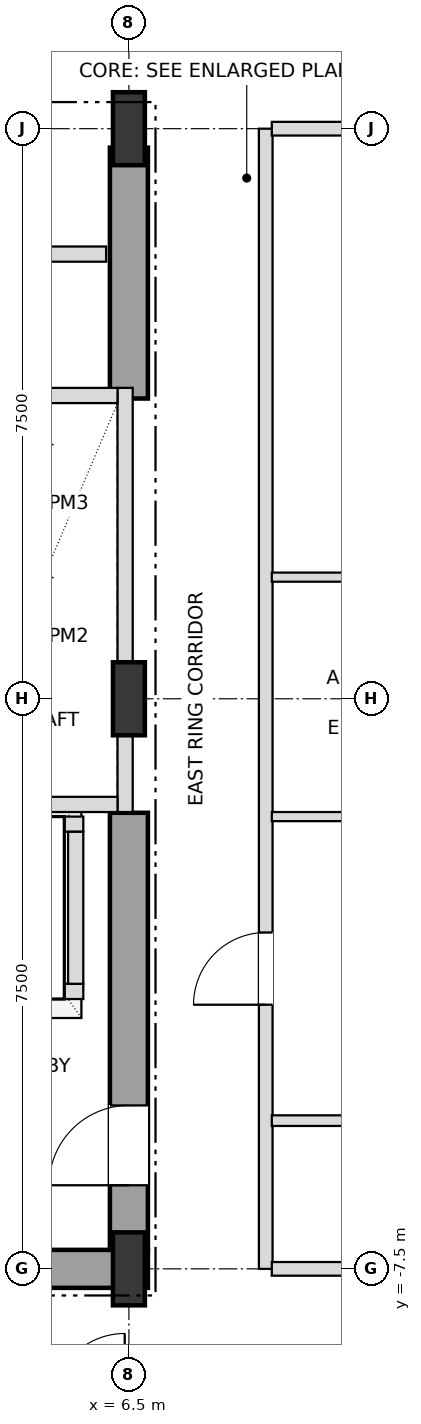
"""IFC4 building model, lengths in metres.
Left out: names, types, materials, properties, quantities, classifications, styles, units other than length and angle.
Written with IfcOpenShell. Run it as: python <this file> out.ifc"""

import sys

from ifc_helpers import new_model, si_unit, direction, frame, frame_2d, origin, origin_2d, place, context, subcontext, project, spatial, rectangle, i_section, extrude, element, fill, save


model = new_model("IFC4")
c1 = context("Model", 3, precision=1e-05, world=origin(), true_north=direction((0.0, 1.0)))
c2 = subcontext(c1, "Body", "Model", "MODEL_VIEW")
j1 = project(units=[si_unit("LENGTHUNIT", "METRE"), si_unit("PLANEANGLEUNIT", "RADIAN")], contexts=[c1])
p1 = place(None, origin())
s1 = spatial("IfcSite", under=j1, at=p1, CompositionType="ELEMENT")
p2 = place(p1, origin())
s2 = spatial("IfcBuilding", under=s1, at=p2, CompositionType="ELEMENT")
p3 = place(p2, frame((0.0, 0.0, 54.0)))
s3 = spatial("IfcBuildingStorey", under=s2, at=p3, CompositionType="ELEMENT", Elevation=54.0)
for number, where, z_axis, x_axis in (
    (1, (6.5, -7.5, 0.0), (0.0, 0.0, 1.0), (1.0, 0.0, 0.0)),
    (2, (6.5, 0.0, 0.0), (0.0, 0.0, 1.0), (1.0, 0.0, 0.0)),
    (3, (6.5, 7.5, 0.0), (0.0, 0.0, 1.0), (1.0, 0.0, 0.0)),
):
    element("IfcColumn", number, at=place(p3, frame(where, z_axis=z_axis, x_axis=x_axis)), inside=s3, PredefinedType="COLUMN", context=c2, shape_type="SweptSolid", body=[
        extrude(i_section(OverallWidth=0.42, OverallDepth=0.96, WebThickness=0.022, FlangeThickness=0.034, at=origin_2d()), origin(), (0.0, 0.0, 1.0), 3.6),
    ])
p4 = place(p3, frame((0.0, -7.5, 0.0), z_axis=(0.0, 0.0, 1.0), x_axis=(1.0, 0.0, 0.0)))
e4 = element("IfcWall", 4, at=p4, inside=s3, PredefinedType="SHEAR", context=c2, shape_type="SweptSolid", body=[
    extrude(rectangle(XDim=6.75, YDim=0.5, at=frame_2d((3.375, 0.0))), origin(), (0.0, 0.0, 1.0), 3.38),
])
p5 = place(p3, frame((6.5, -7.25, 0.0), z_axis=(0.0, 0.0, 1.0), x_axis=(0.0, 1.0, 0.0)))
e5 = element("IfcWall", 5, at=p5, inside=s3, PredefinedType="SHEAR", context=c2, shape_type="SweptSolid", body=[
    extrude(rectangle(XDim=5.75, YDim=0.5, at=frame_2d((2.875, 0.0))), origin(), (0.0, 0.0, 1.0), 3.38),
])
p6 = place(p5, frame((0.85, 0.0, 0.0)))
e6 = element("IfcOpeningElement", 6, at=p6, cuts=e5, PredefinedType="OPENING", context=c2, shape_type="SweptSolid", body=[
    extrude(rectangle(XDim=1.05, YDim=2.15, at=frame_2d((0.525, 1.075))), frame((0.0, 0.26, 0.0), z_axis=(0.0, -1.0, 0.0), x_axis=(1.0, 0.0, 0.0)), (0.0, 0.0, 1.0), 0.52),
])
p7 = place(p3, frame((6.5, 3.95, 0.0), z_axis=(0.0, 0.0, 1.0), x_axis=(0.0, 1.0, 0.0)))
e7 = element("IfcWall", 7, at=p7, inside=s3, PredefinedType="SHEAR", context=c2, shape_type="SweptSolid", body=[
    extrude(rectangle(XDim=3.3, YDim=0.5, at=frame_2d((1.65, 0.0))), origin(), (0.0, 0.0, 1.0), 3.38),
])
p8 = place(p3, frame((6.45, -1.49, 0.0), z_axis=(0.0, 0.0, 1.0), x_axis=(0.0, 1.0, 0.0)))
e8 = element("IfcWall", 8, at=p8, inside=s3, PredefinedType="SOLIDWALL", context=c2, shape_type="SweptSolid", body=[
    extrude(rectangle(XDim=5.58, YDim=0.2, at=frame_2d((2.79, 0.0))), origin(), (0.0, 0.0, 1.0), 2.816),
])
for number, where, z_axis, x_axis in (
    (9, (4.15, -1.39, 0.0), (0.0, 0.0, 1.0), (1.0, 0.0, 0.0)),
    (10, (4.15, 3.99, 0.0), (0.0, 0.0, 1.0), (1.0, 0.0, 0.0)),
):
    element("IfcWall", number, at=place(p3, frame(where, z_axis=z_axis, x_axis=x_axis)), inside=s3, PredefinedType="SOLIDWALL", context=c2, shape_type="SweptSolid", body=[
        extrude(rectangle(XDim=2.2, YDim=0.2, at=frame_2d((1.1, 0.0))), origin(), (0.0, 0.0, 1.0), 3.38),
    ])
p9 = place(p3, frame((1.8, -3.85, 0.0), z_axis=(0.0, 0.0, 1.0), x_axis=(1.0, 0.0, 0.0)))
e11 = element("IfcWall", 11, at=p9, inside=s3, PredefinedType="SOLIDWALL", context=c2, shape_type="SweptSolid", body=[
    extrude(rectangle(XDim=4.1, YDim=0.2, at=frame_2d((2.05, 0.0))), origin(), (0.0, 0.0, 1.0), 3.38),
])
p10 = place(p9, frame((0.45, 0.0, 0.0)))
e12 = element("IfcOpeningElement", 12, at=p10, cuts=e11, PredefinedType="OPENING", context=c2, shape_type="SweptSolid", body=[
    extrude(rectangle(XDim=1.2, YDim=2.2, at=frame_2d((0.6, 1.1))), frame((0.0, 0.11, 0.0), z_axis=(0.0, -1.0, 0.0), x_axis=(1.0, 0.0, 0.0)), (0.0, 0.0, 1.0), 0.22),
])
p11 = place(p9, frame((2.45, 0.0, 0.0)))
e13 = element("IfcOpeningElement", 13, at=p11, cuts=e11, PredefinedType="OPENING", context=c2, shape_type="SweptSolid", body=[
    extrude(rectangle(XDim=1.2, YDim=2.2, at=frame_2d((0.6, 1.1))), frame((0.0, 0.11, 0.0), z_axis=(0.0, -1.0, 0.0), x_axis=(1.0, 0.0, 0.0)), (0.0, 0.0, 1.0), 0.22),
])
p12 = place(p3, frame((1.8, -1.65, 0.0), z_axis=(0.0, 0.0, 1.0), x_axis=(1.0, 0.0, 0.0)))
e14 = element("IfcWall", 14, at=p12, inside=s3, PredefinedType="SOLIDWALL", context=c2, shape_type="SweptSolid", body=[
    extrude(rectangle(XDim=4.1, YDim=0.2, at=frame_2d((2.05, 0.0))), origin(), (0.0, 0.0, 1.0), 3.38),
])
p13 = place(p3, frame((5.8, -3.75, 0.0), z_axis=(0.0, 0.0, 1.0), x_axis=(0.0, 1.0, 0.0)))
e15 = element("IfcWall", 15, at=p13, inside=s3, PredefinedType="SOLIDWALL", context=c2, shape_type="SweptSolid", body=[
    extrude(rectangle(XDim=2.0, YDim=0.2, at=frame_2d((1.0, 0.0))), origin(), (0.0, 0.0, 1.0), 3.38),
])
p14 = place(p3, frame((8.3, -7.5, 0.0), z_axis=(0.0, 0.0, 1.0), x_axis=(0.0, 1.0, 0.0)))
e16 = element("IfcWall", 16, at=p14, inside=s3, PredefinedType="PARTITIONING", context=c2, shape_type="SweptSolid", body=[
    extrude(rectangle(XDim=15.0, YDim=0.18, at=frame_2d((7.5, 0.0))), origin(), (0.0, 0.0, 1.0), 3.38),
])
p15 = place(p14, frame((3.475, 0.0, 0.0)))
e17 = element("IfcOpeningElement", 17, at=p15, cuts=e16, PredefinedType="OPENING", context=c2, shape_type="SweptSolid", body=[
    extrude(rectangle(XDim=0.95, YDim=2.15, at=frame_2d((0.475, 1.075))), frame((0.0, 0.1, 0.0), z_axis=(0.0, -1.0, 0.0), x_axis=(1.0, 0.0, 0.0)), (0.0, 0.0, 1.0), 0.2),
])
p16 = place(p3, frame((8.38, -7.5, 0.0), z_axis=(0.0, 0.0, 1.0), x_axis=(1.0, 0.0, 0.0)))
e18 = element("IfcWall", 18, at=p16, inside=s3, PredefinedType="PARTITIONING", context=c2, shape_type="SweptSolid", body=[
    extrude(rectangle(XDim=7.64, YDim=0.18, at=frame_2d((3.82, 0.0))), origin(), (0.0, 0.0, 1.0), 2.816),
])
p17 = place(p3, frame((8.38, -5.55, 0.0), z_axis=(0.0, 0.0, 1.0), x_axis=(1.0, 0.0, 0.0)))
e19 = element("IfcWall", 19, at=p17, inside=s3, PredefinedType="PARTITIONING", context=c2, shape_type="SweptSolid", body=[
    extrude(rectangle(XDim=7.64, YDim=0.14, at=frame_2d((3.82, 0.0))), origin(), (0.0, 0.0, 1.0), 2.948),
])
p18 = place(p17, frame((3.37, 0.0, 0.0)))
e20 = element("IfcOpeningElement", 20, at=p18, cuts=e19, PredefinedType="OPENING", context=c2, shape_type="SweptSolid", body=[
    extrude(rectangle(XDim=0.9, YDim=2.1, at=frame_2d((0.45, 1.05))), frame((0.0, 0.08, 0.0), z_axis=(0.0, -1.0, 0.0), x_axis=(1.0, 0.0, 0.0)), (0.0, 0.0, 1.0), 0.16),
])
p19 = place(p3, frame((8.38, -1.55, 0.0), z_axis=(0.0, 0.0, 1.0), x_axis=(1.0, 0.0, 0.0)))
e21 = element("IfcWall", 21, at=p19, inside=s3, PredefinedType="PARTITIONING", context=c2, shape_type="SweptSolid", body=[
    extrude(rectangle(XDim=7.64, YDim=0.12, at=frame_2d((3.82, 0.0))), origin(), (0.0, 0.0, 1.0), 2.948),
])
p20 = place(p19, frame((3.345, 0.0, 0.0)))
e22 = element("IfcOpeningElement", 22, at=p20, cuts=e21, PredefinedType="OPENING", context=c2, shape_type="SweptSolid", body=[
    extrude(rectangle(XDim=0.95, YDim=2.1, at=frame_2d((0.475, 1.05))), frame((0.0, 0.07, 0.0), z_axis=(0.0, -1.0, 0.0), x_axis=(1.0, 0.0, 0.0)), (0.0, 0.0, 1.0), 0.14),
])
p21 = place(p3, frame((8.38, 1.6, 0.0), z_axis=(0.0, 0.0, 1.0), x_axis=(1.0, 0.0, 0.0)))
e23 = element("IfcWall", 23, at=p21, inside=s3, PredefinedType="PARTITIONING", context=c2, shape_type="SweptSolid", body=[
    extrude(rectangle(XDim=7.64, YDim=0.12, at=frame_2d((3.82, 0.0))), origin(), (0.0, 0.0, 1.0), 2.948),
])
p22 = place(p21, frame((3.37, 0.0, 0.0)))
e24 = element("IfcOpeningElement", 24, at=p22, cuts=e23, PredefinedType="OPENING", context=c2, shape_type="SweptSolid", body=[
    extrude(rectangle(XDim=0.9, YDim=2.1, at=frame_2d((0.45, 1.05))), frame((0.0, 0.07, 0.0), z_axis=(0.0, -1.0, 0.0), x_axis=(1.0, 0.0, 0.0)), (0.0, 0.0, 1.0), 0.14),
])
p23 = place(p3, frame((4.13, 5.85, 0.0), z_axis=(0.0, 0.0, 1.0), x_axis=(1.0, 0.0, 0.0)))
e25 = element("IfcWall", 25, at=p23, inside=s3, PredefinedType="SOLIDWALL", context=c2, shape_type="SweptSolid", body=[
    extrude(rectangle(XDim=2.07, YDim=0.2, at=frame_2d((1.035, 0.0))), origin(), (0.0, 0.0, 1.0), 3.38),
])
p24 = place(p3, frame((8.38, 7.5, 0.0), z_axis=(0.0, 0.0, 1.0), x_axis=(1.0, 0.0, 0.0)))
e26 = element("IfcWall", 26, at=p24, inside=s3, PredefinedType="PARTITIONING", context=c2, shape_type="SweptSolid", body=[
    extrude(rectangle(XDim=7.64, YDim=0.18, at=frame_2d((3.82, 0.0))), origin(), (0.0, 0.0, 1.0), 2.816),
])
p25 = place(p6, origin())
e27 = element("IfcDoor", 27, at=p25, inside=s3, OperationType="SINGLE_SWING_LEFT", PredefinedType="DOOR", context=c2, shape_type="SweptSolid", body=[
    extrude(rectangle(XDim=1.05, YDim=2.15, at=frame_2d((0.525, 1.075))), frame((0.0, 0.025, 0.0), z_axis=(0.0, -1.0, 0.0), x_axis=(1.0, 0.0, 0.0)), (0.0, 0.0, 1.0), 0.05),
])
fill(e6, e27)
p26 = place(p15, origin())
e28 = element("IfcDoor", 28, at=p26, inside=s3, OperationType="SINGLE_SWING_LEFT", PredefinedType="DOOR", context=c2, shape_type="SweptSolid", body=[
    extrude(rectangle(XDim=0.95, YDim=2.15, at=frame_2d((0.475, 1.075))), frame((0.0, 0.025, 0.0), z_axis=(0.0, -1.0, 0.0), x_axis=(1.0, 0.0, 0.0)), (0.0, 0.0, 1.0), 0.05),
])
fill(e17, e28)
save(model, sys.argv[1])
